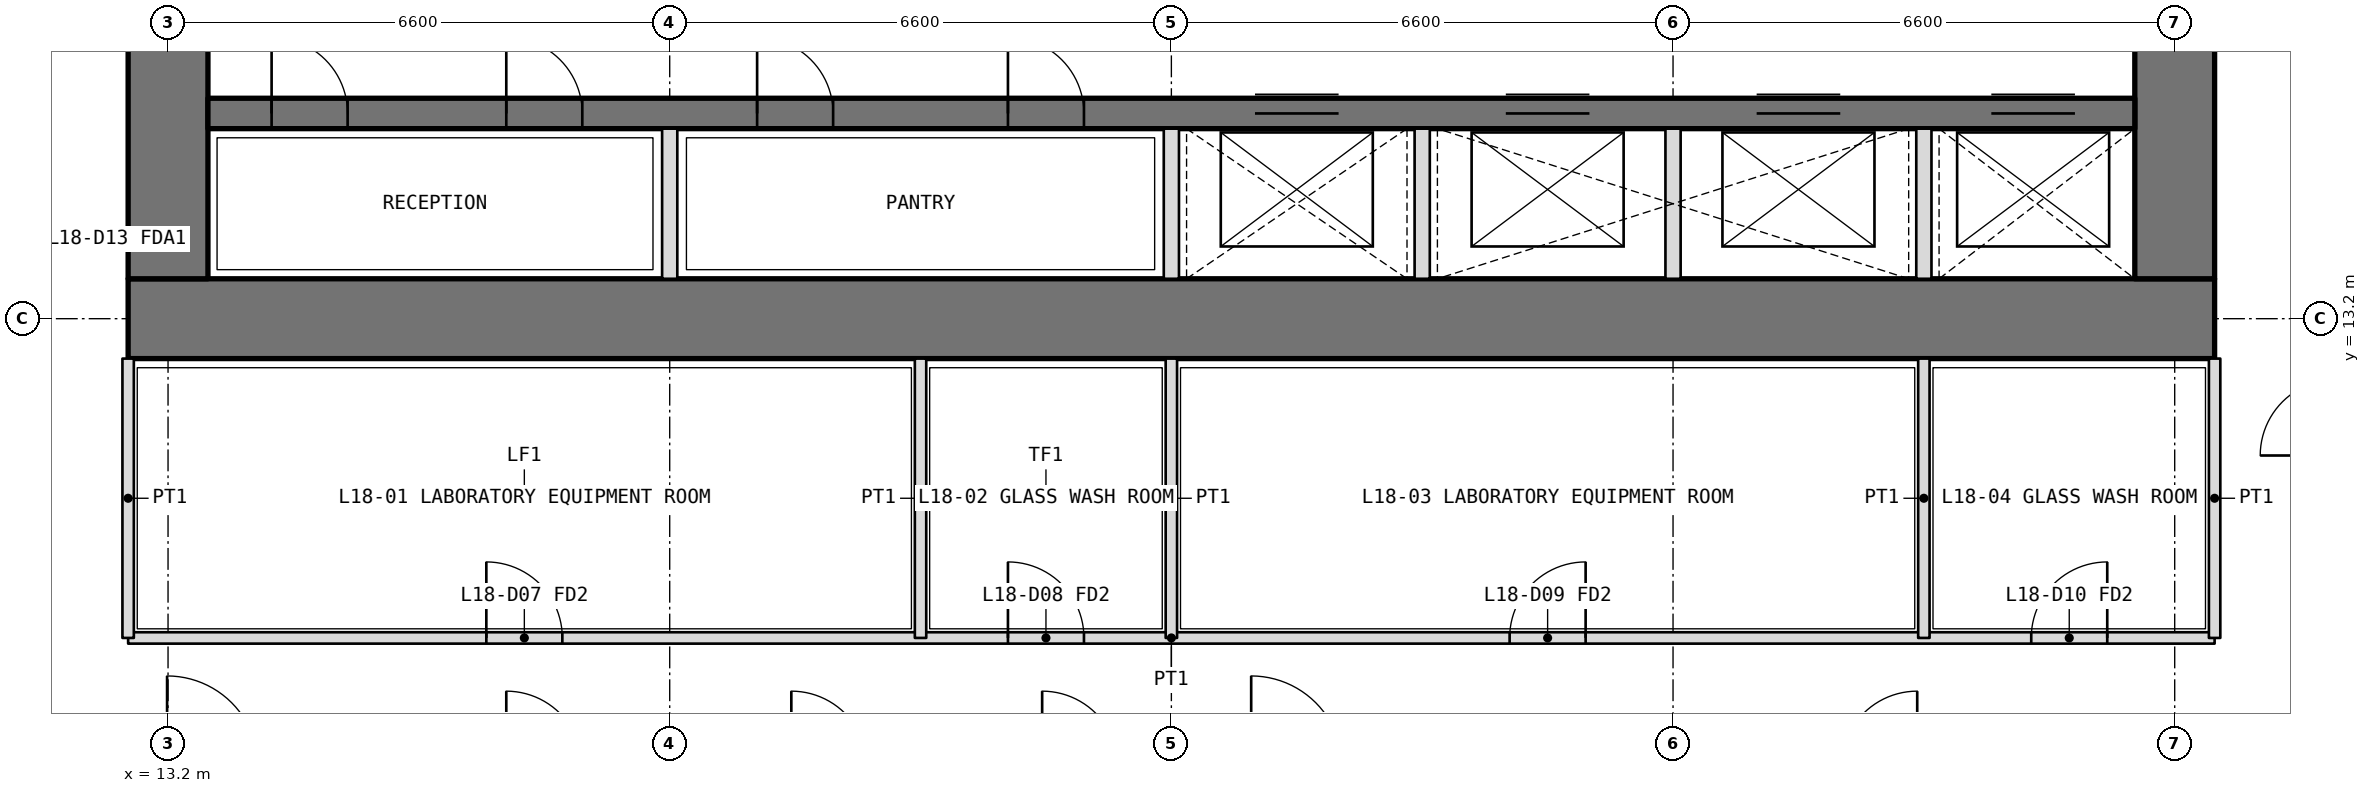
"""IFC4 building model, lengths in metres.
Left out: names, types, materials, properties, quantities, classifications, styles, units other than length and angle.
Written with IfcOpenShell. Run it as: python <this file> out.ifc"""

import sys

from ifc_helpers import new_model, si_unit, direction, frame, frame_2d, origin, place, context, subcontext, project, spatial, rectangle, extrude, element, fill, save


model = new_model("IFC4")
c1 = context("Model", 3, precision=1e-05, world=origin(), true_north=direction((0.0, 1.0)))
c2 = subcontext(c1, "Body", "Model", "MODEL_VIEW")
j1 = project(units=[si_unit("LENGTHUNIT", "METRE"), si_unit("PLANEANGLEUNIT", "RADIAN")], contexts=[c1])
p1 = place(None, origin())
s1 = spatial("IfcSite", under=j1, at=p1, CompositionType="ELEMENT")
p2 = place(p1, origin())
s2 = spatial("IfcBuilding", under=s1, at=p2, CompositionType="ELEMENT")
p3 = place(p2, frame((0.0, 0.0, 82.2)))
s3 = spatial("IfcBuildingStorey", under=s2, at=p3, CompositionType="ELEMENT", Elevation=82.2)
p4 = place(p3, frame((12.675, 13.2, 0.0), z_axis=(0.0, 0.0, 1.0), x_axis=(1.0, 0.0, 0.0)))
e1 = element("IfcWall", 1, at=p4, inside=s3, PredefinedType="SHEAR", context=c2, shape_type="SweptSolid", body=[
    extrude(rectangle(XDim=27.45, YDim=1.05, at=frame_2d((13.725, 0.0))), origin(), (0.0, 0.0, 1.0), 4.2),
])
p5 = place(p3, frame((39.6, 13.725, 0.0), z_axis=(0.0, 0.0, 1.0), x_axis=(0.0, 1.0, 0.0)))
e2 = element("IfcWall", 2, at=p5, inside=s3, PredefinedType="SHEAR", context=c2, shape_type="SweptSolid", body=[
    extrude(rectangle(XDim=18.75, YDim=1.05, at=frame_2d((9.375, 0.0))), origin(), (0.0, 0.0, 1.0), 4.2),
])
p6 = place(p5, frame((3.025, 0.0, 0.0)))
e3 = element("IfcOpeningElement", 3, at=p6, cuts=e2, PredefinedType="OPENING", context=c2, shape_type="SweptSolid", body=[
    extrude(rectangle(XDim=1.6, YDim=2.1, at=frame_2d((0.8, 1.05))), frame((0.0, 0.535, 0.0), z_axis=(0.0, -1.0, 0.0), x_axis=(1.0, 0.0, 0.0)), (0.0, 0.0, 1.0), 1.07),
])
p7 = place(p5, frame((13.825, 0.0, 0.0)))
e4 = element("IfcOpeningElement", 4, at=p7, cuts=e2, PredefinedType="OPENING", context=c2, shape_type="SweptSolid", body=[
    extrude(rectangle(XDim=1.6, YDim=2.1, at=frame_2d((0.8, 1.05))), frame((0.0, 0.535, 0.0), z_axis=(0.0, -1.0, 0.0), x_axis=(1.0, 0.0, 0.0)), (0.0, 0.0, 1.0), 1.07),
])
p8 = place(p3, frame((13.2, 32.475, 0.0), z_axis=(0.0, 0.0, 1.0), x_axis=(0.0, -1.0, 0.0)))
e5 = element("IfcWall", 5, at=p8, inside=s3, PredefinedType="SHEAR", context=c2, shape_type="SweptSolid", body=[
    extrude(rectangle(XDim=18.75, YDim=1.05, at=frame_2d((9.375, 0.0))), origin(), (0.0, 0.0, 1.0), 4.2),
])
p9 = place(p8, frame((14.125, 0.0, 0.0)))
e6 = element("IfcOpeningElement", 6, at=p9, cuts=e5, PredefinedType="OPENING", context=c2, shape_type="SweptSolid", body=[
    extrude(rectangle(XDim=1.6, YDim=2.1, at=frame_2d((0.8, 1.05))), frame((0.0, 0.535, 0.0), z_axis=(0.0, -1.0, 0.0), x_axis=(1.0, 0.0, 0.0)), (0.0, 0.0, 1.0), 1.07),
])
p10 = place(p8, frame((3.325, 0.0, 0.0)))
e7 = element("IfcOpeningElement", 7, at=p10, cuts=e5, PredefinedType="OPENING", context=c2, shape_type="SweptSolid", body=[
    extrude(rectangle(XDim=1.6, YDim=2.1, at=frame_2d((0.8, 1.05))), frame((0.0, 0.535, 0.0), z_axis=(0.0, -1.0, 0.0), x_axis=(1.0, 0.0, 0.0)), (0.0, 0.0, 1.0), 1.07),
])
p11 = place(p3, frame((13.725, 15.9, 0.0), z_axis=(0.0, 0.0, 1.0), x_axis=(1.0, 0.0, 0.0)))
e8 = element("IfcWall", 8, at=p11, inside=s3, PredefinedType="SHEAR", context=c2, shape_type="SweptSolid", body=[
    extrude(rectangle(XDim=25.35, YDim=0.4, at=frame_2d((12.675, 0.0))), origin(), (0.0, 0.0, 1.0), 4.2),
])
p12 = place(p11, frame((0.837, 0.0, 0.0)))
e9 = element("IfcOpeningElement", 9, at=p12, cuts=e8, PredefinedType="OPENING", context=c2, shape_type="SweptSolid", body=[
    extrude(rectangle(XDim=1.0, YDim=2.1, at=frame_2d((0.5, 1.05))), frame((0.0, 0.21, 0.0), z_axis=(0.0, -1.0, 0.0), x_axis=(1.0, 0.0, 0.0)), (0.0, 0.0, 1.0), 0.42),
])
p13 = place(p11, frame((3.925, 0.0, 0.0)))
e10 = element("IfcOpeningElement", 10, at=p13, cuts=e8, PredefinedType="OPENING", context=c2, shape_type="SweptSolid", body=[
    extrude(rectangle(XDim=1.0, YDim=2.1, at=frame_2d((0.5, 1.05))), frame((0.0, 0.21, 0.0), z_axis=(0.0, -1.0, 0.0), x_axis=(1.0, 0.0, 0.0)), (0.0, 0.0, 1.0), 0.42),
])
p14 = place(p11, frame((7.225, 0.0, 0.0)))
e11 = element("IfcOpeningElement", 11, at=p14, cuts=e8, PredefinedType="OPENING", context=c2, shape_type="SweptSolid", body=[
    extrude(rectangle(XDim=1.0, YDim=2.1, at=frame_2d((0.5, 1.05))), frame((0.0, 0.21, 0.0), z_axis=(0.0, -1.0, 0.0), x_axis=(1.0, 0.0, 0.0)), (0.0, 0.0, 1.0), 0.42),
])
p15 = place(p11, frame((10.525, 0.0, 0.0)))
e12 = element("IfcOpeningElement", 12, at=p15, cuts=e8, PredefinedType="OPENING", context=c2, shape_type="SweptSolid", body=[
    extrude(rectangle(XDim=1.0, YDim=2.1, at=frame_2d((0.5, 1.05))), frame((0.0, 0.21, 0.0), z_axis=(0.0, -1.0, 0.0), x_axis=(1.0, 0.0, 0.0)), (0.0, 0.0, 1.0), 0.42),
])
p16 = place(p11, frame((13.775, 0.0, 0.0)))
e13 = element("IfcOpeningElement", 13, at=p16, cuts=e8, PredefinedType="OPENING", context=c2, shape_type="SweptSolid", body=[
    extrude(rectangle(XDim=1.1, YDim=2.1, at=frame_2d((0.55, 1.05))), frame((0.0, 0.21, 0.0), z_axis=(0.0, -1.0, 0.0), x_axis=(1.0, 0.0, 0.0)), (0.0, 0.0, 1.0), 0.42),
])
p17 = place(p11, frame((17.075, 0.0, 0.0)))
e14 = element("IfcOpeningElement", 14, at=p17, cuts=e8, PredefinedType="OPENING", context=c2, shape_type="SweptSolid", body=[
    extrude(rectangle(XDim=1.1, YDim=2.1, at=frame_2d((0.55, 1.05))), frame((0.0, 0.21, 0.0), z_axis=(0.0, -1.0, 0.0), x_axis=(1.0, 0.0, 0.0)), (0.0, 0.0, 1.0), 0.42),
])
p18 = place(p11, frame((20.375, 0.0, 0.0)))
e15 = element("IfcOpeningElement", 15, at=p18, cuts=e8, PredefinedType="OPENING", context=c2, shape_type="SweptSolid", body=[
    extrude(rectangle(XDim=1.1, YDim=2.1, at=frame_2d((0.55, 1.05))), frame((0.0, 0.21, 0.0), z_axis=(0.0, -1.0, 0.0), x_axis=(1.0, 0.0, 0.0)), (0.0, 0.0, 1.0), 0.42),
])
p19 = place(p11, frame((23.462, 0.0, 0.0)))
e16 = element("IfcOpeningElement", 16, at=p19, cuts=e8, PredefinedType="OPENING", context=c2, shape_type="SweptSolid", body=[
    extrude(rectangle(XDim=1.1, YDim=2.1, at=frame_2d((0.55, 1.05))), frame((0.0, 0.21, 0.0), z_axis=(0.0, -1.0, 0.0), x_axis=(1.0, 0.0, 0.0)), (0.0, 0.0, 1.0), 0.42),
])
for number, where, z_axis, x_axis in (
    (17, (19.8, 13.725, 0.0), (0.0, 0.0, 1.0), (0.0, 1.0, 0.0)),
    (18, (26.4, 13.725, 0.0), (0.0, 0.0, 1.0), (0.0, 1.0, 0.0)),
    (19, (29.7, 13.725, 0.0), (0.0, 0.0, 1.0), (0.0, 1.0, 0.0)),
    (20, (33.0, 13.725, 0.0), (0.0, 0.0, 1.0), (0.0, 1.0, 0.0)),
    (21, (36.3, 13.725, 0.0), (0.0, 0.0, 1.0), (0.0, 1.0, 0.0)),
):
    element("IfcWall", number, at=place(p3, frame(where, z_axis=z_axis, x_axis=x_axis)), inside=s3, PredefinedType="PARTITIONING", context=c2, shape_type="SweptSolid", body=[
        extrude(rectangle(XDim=1.975, YDim=0.2, at=frame_2d((0.987, 0.0))), origin(), (0.0, 0.0, 1.0), 4.2),
    ])
p20 = place(p3, frame((12.675, 9.0, 0.0), z_axis=(0.0, 0.0, 1.0), x_axis=(1.0, 0.0, 0.0)))
e22 = element("IfcWall", 22, at=p20, inside=s3, PredefinedType="PARTITIONING", context=c2, shape_type="SweptSolid", body=[
    extrude(rectangle(XDim=27.45, YDim=0.15, at=frame_2d((13.725, 0.0))), origin(), (0.0, 0.0, 1.0), 2.85),
])
p21 = place(p20, frame((4.712, 0.0, 0.0)))
e23 = element("IfcOpeningElement", 23, at=p21, cuts=e22, PredefinedType="OPENING", context=c2, shape_type="SweptSolid", body=[
    extrude(rectangle(XDim=1.0, YDim=2.1, at=frame_2d((0.5, 1.05))), frame((0.0, 0.085, 0.0), z_axis=(0.0, -1.0, 0.0), x_axis=(1.0, 0.0, 0.0)), (0.0, 0.0, 1.0), 0.17),
])
p22 = place(p20, frame((11.575, 0.0, 0.0)))
e24 = element("IfcOpeningElement", 24, at=p22, cuts=e22, PredefinedType="OPENING", context=c2, shape_type="SweptSolid", body=[
    extrude(rectangle(XDim=1.0, YDim=2.1, at=frame_2d((0.5, 1.05))), frame((0.0, 0.085, 0.0), z_axis=(0.0, -1.0, 0.0), x_axis=(1.0, 0.0, 0.0)), (0.0, 0.0, 1.0), 0.17),
])
p23 = place(p20, frame((18.175, 0.0, 0.0)))
e25 = element("IfcOpeningElement", 25, at=p23, cuts=e22, PredefinedType="OPENING", context=c2, shape_type="SweptSolid", body=[
    extrude(rectangle(XDim=1.0, YDim=2.1, at=frame_2d((0.5, 1.05))), frame((0.0, 0.085, 0.0), z_axis=(0.0, -1.0, 0.0), x_axis=(1.0, 0.0, 0.0)), (0.0, 0.0, 1.0), 0.17),
])
p24 = place(p20, frame((25.038, 0.0, 0.0)))
e26 = element("IfcOpeningElement", 26, at=p24, cuts=e22, PredefinedType="OPENING", context=c2, shape_type="SweptSolid", body=[
    extrude(rectangle(XDim=1.0, YDim=2.1, at=frame_2d((0.5, 1.05))), frame((0.0, 0.085, 0.0), z_axis=(0.0, -1.0, 0.0), x_axis=(1.0, 0.0, 0.0)), (0.0, 0.0, 1.0), 0.17),
])
for number, where, z_axis, x_axis in (
    (27, (12.675, 12.675, 0.0), (0.0, 0.0, 1.0), (0.0, -1.0, 0.0)),
    (28, (40.125, 12.675, 0.0), (0.0, 0.0, 1.0), (0.0, -1.0, 0.0)),
):
    element("IfcWall", number, at=place(p3, frame(where, z_axis=z_axis, x_axis=x_axis)), inside=s3, PredefinedType="PARTITIONING", context=c2, shape_type="SweptSolid", body=[
        extrude(rectangle(XDim=3.675, YDim=0.15, at=frame_2d((1.837, 0.0))), origin(), (0.0, 0.0, 1.0), 2.85),
    ])
p25 = place(p3, frame((23.1, 12.675, 0.0), z_axis=(0.0, 0.0, 1.0), x_axis=(0.0, -1.0, 0.0)))
e29 = element("IfcWall", 29, at=p25, inside=s3, PredefinedType="PARTITIONING", context=c2, shape_type="SweptSolid", body=[
    extrude(rectangle(XDim=3.675, YDim=0.15, at=frame_2d((1.837, 0.0))), origin(), (0.0, 0.0, 1.0), 3.9),
])
p26 = place(p3, frame((26.4, 12.675, 0.0), z_axis=(0.0, 0.0, 1.0), x_axis=(0.0, -1.0, 0.0)))
e30 = element("IfcWall", 30, at=p26, inside=s3, PredefinedType="PARTITIONING", context=c2, shape_type="SweptSolid", body=[
    extrude(rectangle(XDim=3.675, YDim=0.15, at=frame_2d((1.837, 0.0))), origin(), (0.0, 0.0, 1.0), 2.85),
])
p27 = place(p3, frame((36.3, 12.675, 0.0), z_axis=(0.0, 0.0, 1.0), x_axis=(0.0, -1.0, 0.0)))
e31 = element("IfcWall", 31, at=p27, inside=s3, PredefinedType="PARTITIONING", context=c2, shape_type="SweptSolid", body=[
    extrude(rectangle(XDim=3.675, YDim=0.15, at=frame_2d((1.837, 0.0))), origin(), (0.0, 0.0, 1.0), 3.9),
])
p28 = place(p21, origin())
e32 = element("IfcDoor", 32, at=p28, inside=s3, OperationType="SINGLE_SWING_LEFT", PredefinedType="DOOR", context=c2, shape_type="SweptSolid", body=[
    extrude(rectangle(XDim=1.0, YDim=2.1, at=frame_2d((0.5, 1.05))), frame((0.0, 0.025, 0.0), z_axis=(0.0, -1.0, 0.0), x_axis=(1.0, 0.0, 0.0)), (0.0, 0.0, 1.0), 0.05),
])
fill(e23, e32)
p29 = place(p22, origin())
e33 = element("IfcDoor", 33, at=p29, inside=s3, OperationType="SINGLE_SWING_LEFT", PredefinedType="DOOR", context=c2, shape_type="SweptSolid", body=[
    extrude(rectangle(XDim=1.0, YDim=2.1, at=frame_2d((0.5, 1.05))), frame((0.0, 0.025, 0.0), z_axis=(0.0, -1.0, 0.0), x_axis=(1.0, 0.0, 0.0)), (0.0, 0.0, 1.0), 0.05),
])
fill(e24, e33)
p30 = place(p23, origin())
e34 = element("IfcDoor", 34, at=p30, inside=s3, OperationType="SINGLE_SWING_RIGHT", PredefinedType="DOOR", context=c2, shape_type="SweptSolid", body=[
    extrude(rectangle(XDim=1.0, YDim=2.1, at=frame_2d((0.5, 1.05))), frame((0.0, 0.025, 0.0), z_axis=(0.0, -1.0, 0.0), x_axis=(1.0, 0.0, 0.0)), (0.0, 0.0, 1.0), 0.05),
])
fill(e25, e34)
p31 = place(p24, origin())
e35 = element("IfcDoor", 35, at=p31, inside=s3, OperationType="SINGLE_SWING_RIGHT", PredefinedType="DOOR", context=c2, shape_type="SweptSolid", body=[
    extrude(rectangle(XDim=1.0, YDim=2.1, at=frame_2d((0.5, 1.05))), frame((0.0, 0.025, 0.0), z_axis=(0.0, -1.0, 0.0), x_axis=(1.0, 0.0, 0.0)), (0.0, 0.0, 1.0), 0.05),
])
fill(e26, e35)
p32 = place(p12, origin())
e36 = element("IfcDoor", 36, at=p32, inside=s3, OperationType="SINGLE_SWING_LEFT", PredefinedType="DOOR", context=c2, shape_type="SweptSolid", body=[
    extrude(rectangle(XDim=1.0, YDim=2.1, at=frame_2d((0.5, 1.05))), frame((0.0, 0.025, 0.0), z_axis=(0.0, -1.0, 0.0), x_axis=(1.0, 0.0, 0.0)), (0.0, 0.0, 1.0), 0.05),
])
fill(e9, e36)
p33 = place(p13, origin())
e37 = element("IfcDoor", 37, at=p33, inside=s3, OperationType="SINGLE_SWING_LEFT", PredefinedType="DOOR", context=c2, shape_type="SweptSolid", body=[
    extrude(rectangle(XDim=1.0, YDim=2.1, at=frame_2d((0.5, 1.05))), frame((0.0, 0.025, 0.0), z_axis=(0.0, -1.0, 0.0), x_axis=(1.0, 0.0, 0.0)), (0.0, 0.0, 1.0), 0.05),
])
fill(e10, e37)
p34 = place(p14, origin())
e38 = element("IfcDoor", 38, at=p34, inside=s3, OperationType="SINGLE_SWING_LEFT", PredefinedType="DOOR", context=c2, shape_type="SweptSolid", body=[
    extrude(rectangle(XDim=1.0, YDim=2.1, at=frame_2d((0.5, 1.05))), frame((0.0, 0.025, 0.0), z_axis=(0.0, -1.0, 0.0), x_axis=(1.0, 0.0, 0.0)), (0.0, 0.0, 1.0), 0.05),
])
fill(e11, e38)
p35 = place(p15, origin())
e39 = element("IfcDoor", 39, at=p35, inside=s3, OperationType="SINGLE_SWING_LEFT", PredefinedType="DOOR", context=c2, shape_type="SweptSolid", body=[
    extrude(rectangle(XDim=1.0, YDim=2.1, at=frame_2d((0.5, 1.05))), frame((0.0, 0.025, 0.0), z_axis=(0.0, -1.0, 0.0), x_axis=(1.0, 0.0, 0.0)), (0.0, 0.0, 1.0), 0.05),
])
fill(e12, e39)
p36 = place(p16, origin())
e40 = element("IfcDoor", 40, at=p36, inside=s3, OperationType="DOUBLE_DOOR_SLIDING", PredefinedType="DOOR", context=c2, shape_type="SweptSolid", body=[
    extrude(rectangle(XDim=1.1, YDim=2.1, at=frame_2d((0.55, 1.05))), frame((0.0, 0.025, 0.0), z_axis=(0.0, -1.0, 0.0), x_axis=(1.0, 0.0, 0.0)), (0.0, 0.0, 1.0), 0.05),
])
fill(e13, e40)
p37 = place(p17, origin())
e41 = element("IfcDoor", 41, at=p37, inside=s3, OperationType="DOUBLE_DOOR_SLIDING", PredefinedType="DOOR", context=c2, shape_type="SweptSolid", body=[
    extrude(rectangle(XDim=1.1, YDim=2.1, at=frame_2d((0.55, 1.05))), frame((0.0, 0.025, 0.0), z_axis=(0.0, -1.0, 0.0), x_axis=(1.0, 0.0, 0.0)), (0.0, 0.0, 1.0), 0.05),
])
fill(e14, e41)
p38 = place(p18, origin())
e42 = element("IfcDoor", 42, at=p38, inside=s3, OperationType="DOUBLE_DOOR_SLIDING", PredefinedType="DOOR", context=c2, shape_type="SweptSolid", body=[
    extrude(rectangle(XDim=1.1, YDim=2.1, at=frame_2d((0.55, 1.05))), frame((0.0, 0.025, 0.0), z_axis=(0.0, -1.0, 0.0), x_axis=(1.0, 0.0, 0.0)), (0.0, 0.0, 1.0), 0.05),
])
fill(e15, e42)
p39 = place(p19, origin())
e43 = element("IfcDoor", 43, at=p39, inside=s3, OperationType="DOUBLE_DOOR_SLIDING", PredefinedType="DOOR", context=c2, shape_type="SweptSolid", body=[
    extrude(rectangle(XDim=1.1, YDim=2.1, at=frame_2d((0.55, 1.05))), frame((0.0, 0.025, 0.0), z_axis=(0.0, -1.0, 0.0), x_axis=(1.0, 0.0, 0.0)), (0.0, 0.0, 1.0), 0.05),
])
fill(e16, e43)
save(model, sys.argv[1])
